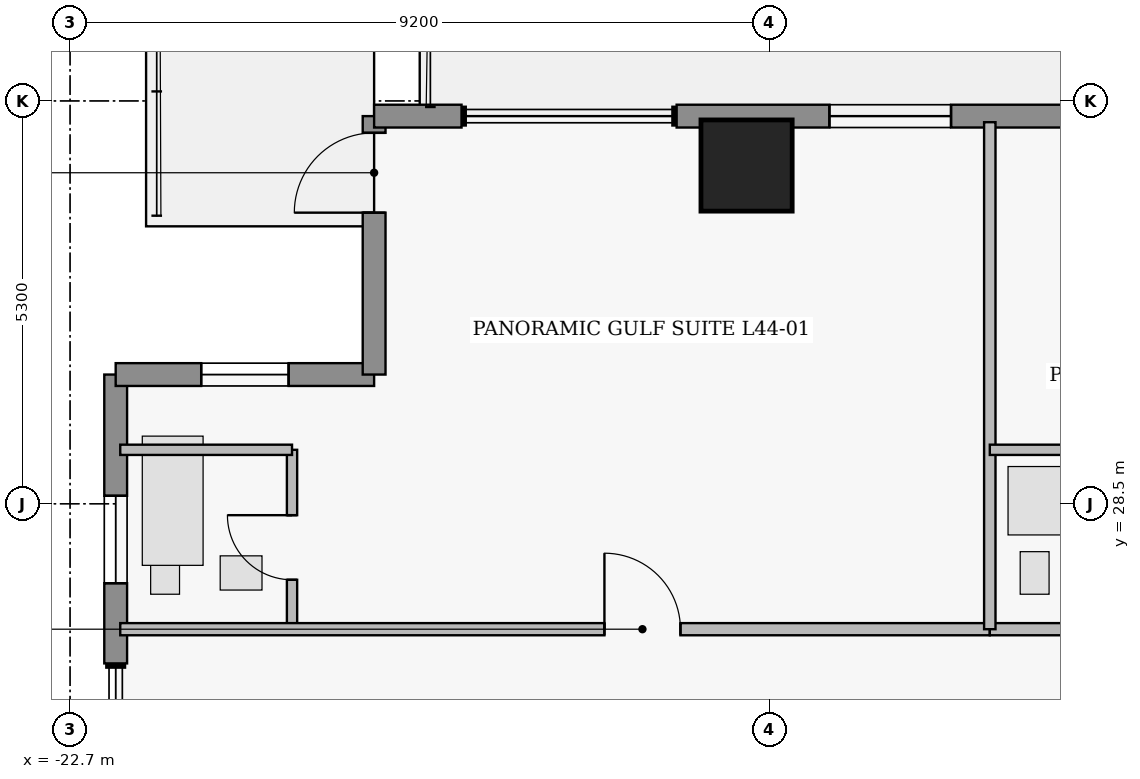
"""IFC4 building model, lengths in metres.
Left out: names, types, materials, properties, quantities, classifications, styles, units other than length and angle.
Written with IfcOpenShell. Run it as: python <this file> out.ifc"""

import sys

from ifc_helpers import new_model, si_unit, direction, frame, frame_2d, origin, origin_2d, place, context, subcontext, project, spatial, rectangle, extrude, element, fill, save


model = new_model("IFC4")
c1 = context("Model", 3, precision=1e-05, world=origin(), true_north=direction((0.0, 1.0)))
c2 = subcontext(c1, "Body", "Model", "MODEL_VIEW")
j1 = project(units=[si_unit("LENGTHUNIT", "METRE"), si_unit("PLANEANGLEUNIT", "RADIAN")], contexts=[c1])
p1 = place(None, origin())
s1 = spatial("IfcSite", under=j1, at=p1, CompositionType="ELEMENT")
p2 = place(p1, origin())
s2 = spatial("IfcBuilding", under=s1, at=p2, CompositionType="ELEMENT")
p3 = place(p2, frame((0.0, 0.0, 177.4)))
s3 = spatial("IfcBuildingStorey", under=s2, at=p3, CompositionType="ELEMENT", Elevation=177.4)
p4 = place(p3, frame((-13.8, 32.95, 0.0), z_axis=(0.0, 0.0, 1.0), x_axis=(1.0, 0.0, 0.0)))
e1 = element("IfcColumn", 1, at=p4, inside=s3, PredefinedType="COLUMN", context=c2, shape_type="SweptSolid", body=[
    extrude(rectangle(XDim=1.2, YDim=1.2, at=origin_2d()), origin(), (0.0, 0.0, 1.0), 3.75),
])
p5 = place(p3, frame((-22.1, 26.4, 0.0), z_axis=(0.0, 0.0, 1.0), x_axis=(0.0, 1.0, 0.0)))
e2 = element("IfcWall", 2, at=p5, inside=s3, PredefinedType="STANDARD", context=c2, shape_type="SweptSolid", body=[
    extrude(rectangle(XDim=3.8, YDim=0.3, at=frame_2d((1.9, 0.0))), origin(), (0.0, 0.0, 1.0), 3.53),
])
p6 = place(p5, frame((1.055, 0.0, 0.95)))
e3 = element("IfcOpeningElement", 3, at=p6, cuts=e2, PredefinedType="OPENING", context=c2, shape_type="SweptSolid", body=[
    extrude(rectangle(XDim=1.15, YDim=1.55, at=frame_2d((0.575, 0.775))), frame((0.0, 0.16, 0.0), z_axis=(0.0, -1.0, 0.0), x_axis=(1.0, 0.0, 0.0)), (0.0, 0.0, 1.0), 0.32),
])
p7 = place(p3, frame((-22.1, 30.2, 0.0), z_axis=(0.0, 0.0, 1.0), x_axis=(1.0, 0.0, 0.0)))
e4 = element("IfcWall", 4, at=p7, inside=s3, PredefinedType="STANDARD", context=c2, shape_type="SweptSolid", body=[
    extrude(rectangle(XDim=3.4, YDim=0.3, at=frame_2d((1.7, 0.0))), origin(), (0.0, 0.0, 1.0), 3.53),
])
p8 = place(p7, frame((1.125, 0.0, 1.25)))
e5 = element("IfcOpeningElement", 5, at=p8, cuts=e4, PredefinedType="OPENING", context=c2, shape_type="SweptSolid", body=[
    extrude(rectangle(XDim=1.15, YDim=1.55, at=frame_2d((0.575, 0.775))), frame((0.0, 0.16, 0.0), z_axis=(0.0, -1.0, 0.0), x_axis=(1.0, 0.0, 0.0)), (0.0, 0.0, 1.0), 0.32),
])
p9 = place(p3, frame((-18.7, 30.2, 0.0), z_axis=(0.0, 0.0, 1.0), x_axis=(0.0, 1.0, 0.0)))
e6 = element("IfcWall", 6, at=p9, inside=s3, PredefinedType="STANDARD", context=c2, shape_type="SweptSolid", body=[
    extrude(rectangle(XDim=3.4, YDim=0.3, at=frame_2d((1.7, 0.0))), origin(), (0.0, 0.0, 1.0), 3.53),
])
p10 = place(p9, frame((2.13, 0.0, 0.0)))
e7 = element("IfcOpeningElement", 7, at=p10, cuts=e6, PredefinedType="OPENING", context=c2, shape_type="SweptSolid", body=[
    extrude(rectangle(XDim=1.05, YDim=2.2, at=frame_2d((0.525, 1.1))), frame((0.0, 0.16, 0.0), z_axis=(0.0, -1.0, 0.0), x_axis=(1.0, 0.0, 0.0)), (0.0, 0.0, 1.0), 0.32),
])
p11 = place(p3, frame((-18.7, 33.6, 0.0), z_axis=(0.0, 0.0, 1.0), x_axis=(1.0, 0.0, 0.0)))
e8 = element("IfcWall", 8, at=p11, inside=s3, PredefinedType="STANDARD", context=c2, shape_type="SweptSolid", body=[
    extrude(rectangle(XDim=1.15, YDim=0.3, at=frame_2d((0.575, 0.0))), origin(), (0.0, 0.0, 1.0), 3.53),
])
p12 = place(p3, frame((-14.72, 33.6, 0.0), z_axis=(0.0, 0.0, 1.0), x_axis=(1.0, 0.0, 0.0)))
e9 = element("IfcWall", 9, at=p12, inside=s3, PredefinedType="STANDARD", context=c2, shape_type="SweptSolid", body=[
    extrude(rectangle(XDim=11.04, YDim=0.3, at=frame_2d((5.52, 0.0))), origin(), (0.0, 0.0, 1.0), 3.53),
])
p13 = place(p12, frame((5.12, 0.0, 0.85)))
e10 = element("IfcOpeningElement", 10, at=p13, cuts=e9, PredefinedType="OPENING", context=c2, shape_type="SweptSolid", body=[
    extrude(rectangle(XDim=1.6, YDim=1.8, at=frame_2d((0.8, 0.9))), frame((0.0, 0.16, 0.0), z_axis=(0.0, -1.0, 0.0), x_axis=(1.0, 0.0, 0.0)), (0.0, 0.0, 1.0), 0.32),
])
p14 = place(p12, frame((2.01, 0.0, 0.85)))
e11 = element("IfcOpeningElement", 11, at=p14, cuts=e9, PredefinedType="OPENING", context=c2, shape_type="SweptSolid", body=[
    extrude(rectangle(XDim=1.6, YDim=1.8, at=frame_2d((0.8, 0.9))), frame((0.0, 0.16, 0.0), z_axis=(0.0, -1.0, 0.0), x_axis=(1.0, 0.0, 0.0)), (0.0, 0.0, 1.0), 0.32),
])
p15 = place(p12, frame((7.395, 0.0, 0.85)))
e12 = element("IfcOpeningElement", 12, at=p15, cuts=e9, PredefinedType="OPENING", context=c2, shape_type="SweptSolid", body=[
    extrude(rectangle(XDim=1.6, YDim=1.8, at=frame_2d((0.8, 0.9))), frame((0.0, 0.16, 0.0), z_axis=(0.0, -1.0, 0.0), x_axis=(1.0, 0.0, 0.0)), (0.0, 0.0, 1.0), 0.32),
])
p16 = place(p3, frame((-19.78, 26.85, 0.0), z_axis=(0.0, 0.0, 1.0), x_axis=(0.0, 1.0, 0.0)))
e13 = element("IfcWall", 13, at=p16, inside=s3, PredefinedType="PLUMBINGWALL", context=c2, shape_type="SweptSolid", body=[
    extrude(rectangle(XDim=2.36, YDim=0.135, at=frame_2d((1.18, 0.0))), origin(), (0.0, 0.0, 1.0), 3.53),
])
p17 = place(p16, frame((0.65, 0.0, 0.0)))
e14 = element("IfcOpeningElement", 14, at=p17, cuts=e13, PredefinedType="OPENING", context=c2, shape_type="SweptSolid", body=[
    extrude(rectangle(XDim=0.85, YDim=2.1, at=frame_2d((0.425, 1.05))), frame((0.0, 0.077, 0.0), z_axis=(0.0, -1.0, 0.0), x_axis=(1.0, 0.0, 0.0)), (0.0, 0.0, 1.0), 0.155),
])
p18 = place(p3, frame((-22.04, 26.85, 0.0), z_axis=(0.0, 0.0, 1.0), x_axis=(1.0, 0.0, 0.0)))
e15 = element("IfcWall", 15, at=p18, inside=s3, PredefinedType="PARTITIONING", context=c2, shape_type="SweptSolid", body=[
    extrude(rectangle(XDim=11.44, YDim=0.16, at=frame_2d((5.72, 0.0))), origin(), (0.0, 0.0, 1.0), 3.53),
])
p19 = place(p18, frame((6.37, 0.0, 0.0)))
e16 = element("IfcOpeningElement", 16, at=p19, cuts=e15, PredefinedType="OPENING", context=c2, shape_type="SweptSolid", body=[
    extrude(rectangle(XDim=1.0, YDim=2.15, at=frame_2d((0.5, 1.075))), frame((0.0, 0.09, 0.0), z_axis=(0.0, -1.0, 0.0), x_axis=(1.0, 0.0, 0.0)), (0.0, 0.0, 1.0), 0.18),
])
p20 = place(p3, frame((-10.6, 26.85, 0.0), z_axis=(0.0, 0.0, 1.0), x_axis=(1.0, 0.0, 0.0)))
e17 = element("IfcWall", 17, at=p20, inside=s3, PredefinedType="PARTITIONING", context=c2, shape_type="SweptSolid", body=[
    extrude(rectangle(XDim=6.0, YDim=0.16, at=frame_2d((3.0, 0.0))), origin(), (0.0, 0.0, 1.0), 3.53),
])
p21 = place(p20, frame((3.65, 0.0, 0.0)))
e18 = element("IfcOpeningElement", 18, at=p21, cuts=e17, PredefinedType="OPENING", context=c2, shape_type="SweptSolid", body=[
    extrude(rectangle(XDim=1.0, YDim=2.15, at=frame_2d((0.5, 1.075))), frame((0.0, 0.09, 0.0), z_axis=(0.0, -1.0, 0.0), x_axis=(1.0, 0.0, 0.0)), (0.0, 0.0, 1.0), 0.18),
])
p22 = place(p3, frame((-22.04, 29.21, 0.0), z_axis=(0.0, 0.0, 1.0), x_axis=(1.0, 0.0, 0.0)))
e19 = element("IfcWall", 19, at=p22, inside=s3, PredefinedType="PLUMBINGWALL", context=c2, shape_type="SweptSolid", body=[
    extrude(rectangle(XDim=2.26, YDim=0.135, at=frame_2d((1.13, 0.0))), origin(), (0.0, 0.0, 1.0), 3.53),
])
p23 = place(p3, frame((-10.6, 26.85, 0.0), z_axis=(0.0, 0.0, 1.0), x_axis=(0.0, 1.0, 0.0)))
e20 = element("IfcWall", 20, at=p23, inside=s3, PredefinedType="PARTITIONING", context=c2, shape_type="SweptSolid", body=[
    extrude(rectangle(XDim=6.67, YDim=0.15, at=frame_2d((3.335, 0.0))), origin(), (0.0, 0.0, 1.0), 3.53),
])
p24 = place(p3, frame((-10.6, 29.21, 0.0), z_axis=(0.0, 0.0, 1.0), x_axis=(1.0, 0.0, 0.0)))
e21 = element("IfcWall", 21, at=p24, inside=s3, PredefinedType="PLUMBINGWALL", context=c2, shape_type="SweptSolid", body=[
    extrude(rectangle(XDim=2.26, YDim=0.135, at=frame_2d((1.13, 0.0))), origin(), (0.0, 0.0, 1.0), 3.53),
])
p25 = place(p6, origin())
e22 = element("IfcWindow", 22, at=p25, inside=s3, PartitioningType="SINGLE_PANEL", PredefinedType="WINDOW", context=c2, shape_type="SweptSolid", body=[
    extrude(rectangle(XDim=1.15, YDim=1.55, at=frame_2d((0.575, 0.775))), frame((0.0, 0.03, 0.0), z_axis=(0.0, -1.0, 0.0), x_axis=(1.0, 0.0, 0.0)), (0.0, 0.0, 1.0), 0.06),
])
fill(e3, e22)
p26 = place(p8, origin())
e23 = element("IfcWindow", 23, at=p26, inside=s3, PartitioningType="SINGLE_PANEL", PredefinedType="WINDOW", context=c2, shape_type="SweptSolid", body=[
    extrude(rectangle(XDim=1.15, YDim=1.55, at=frame_2d((0.575, 0.775))), frame((0.0, 0.03, 0.0), z_axis=(0.0, -1.0, 0.0), x_axis=(1.0, 0.0, 0.0)), (0.0, 0.0, 1.0), 0.06),
])
fill(e5, e23)
p27 = place(p10, origin())
e24 = element("IfcDoor", 24, at=p27, inside=s3, OperationType="SINGLE_SWING_LEFT", PredefinedType="DOOR", context=c2, shape_type="SweptSolid", body=[
    extrude(rectangle(XDim=1.05, YDim=2.2, at=frame_2d((0.525, 1.1))), frame((0.0, 0.025, 0.0), z_axis=(0.0, -1.0, 0.0), x_axis=(1.0, 0.0, 0.0)), (0.0, 0.0, 1.0), 0.05),
])
fill(e7, e24)
p28 = place(p14, origin())
e25 = element("IfcWindow", 25, at=p28, inside=s3, PartitioningType="SINGLE_PANEL", PredefinedType="WINDOW", context=c2, shape_type="SweptSolid", body=[
    extrude(rectangle(XDim=1.6, YDim=1.8, at=frame_2d((0.8, 0.9))), frame((0.0, 0.03, 0.0), z_axis=(0.0, -1.0, 0.0), x_axis=(1.0, 0.0, 0.0)), (0.0, 0.0, 1.0), 0.06),
])
fill(e11, e25)
p29 = place(p17, origin())
e26 = element("IfcDoor", 26, at=p29, inside=s3, OperationType="SINGLE_SWING_RIGHT", PredefinedType="DOOR", context=c2, shape_type="SweptSolid", body=[
    extrude(rectangle(XDim=0.85, YDim=2.1, at=frame_2d((0.425, 1.05))), frame((0.0, 0.025, 0.0), z_axis=(0.0, -1.0, 0.0), x_axis=(1.0, 0.0, 0.0)), (0.0, 0.0, 1.0), 0.05),
])
fill(e14, e26)
p30 = place(p19, origin())
e27 = element("IfcDoor", 27, at=p30, inside=s3, OperationType="SINGLE_SWING_LEFT", PredefinedType="DOOR", context=c2, shape_type="SweptSolid", body=[
    extrude(rectangle(XDim=1.0, YDim=2.15, at=frame_2d((0.5, 1.075))), frame((0.0, 0.025, 0.0), z_axis=(0.0, -1.0, 0.0), x_axis=(1.0, 0.0, 0.0)), (0.0, 0.0, 1.0), 0.05),
])
fill(e16, e27)
save(model, sys.argv[1])
